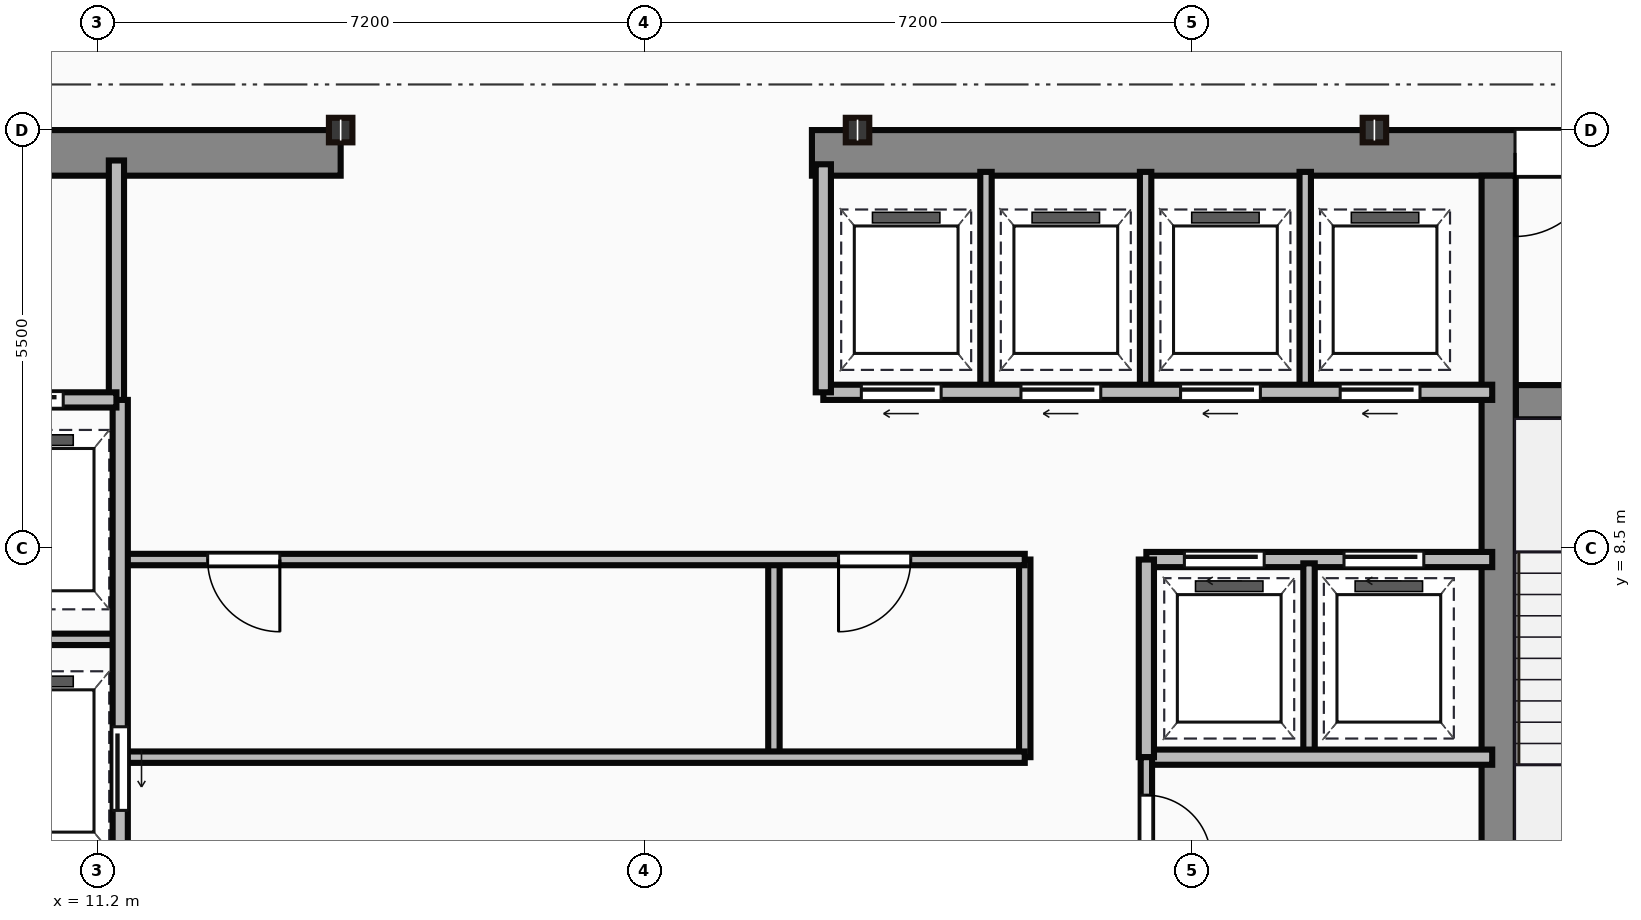
"""IFC4 building model, lengths in metres.
Left out: names, types, materials, properties, quantities, classifications, styles, units other than length and angle.
Written with IfcOpenShell. Run it as: python <this file> out.ifc"""

import sys

from ifc_helpers import new_model, si_unit, direction, frame, frame_2d, origin, origin_2d, place, context, subcontext, project, spatial, rectangle, i_section, extrude, source, transform, mapped, element, fill, save


model = new_model("IFC4")
c1 = context("Model", 3, precision=1e-05, world=origin(), true_north=direction((0.0, 1.0)))
c2 = subcontext(c1, "Body", "Model", "MODEL_VIEW")
j1 = project(units=[si_unit("LENGTHUNIT", "METRE"), si_unit("PLANEANGLEUNIT", "RADIAN")], contexts=[c1])
p1 = place(None, origin())
s1 = spatial("IfcSite", under=j1, at=p1, CompositionType="ELEMENT")
p2 = place(p1, origin())
s2 = spatial("IfcBuilding", under=s1, at=p2, CompositionType="ELEMENT")
p3 = place(p2, frame((0.0, 0.0, 210.5)))
s3 = spatial("IfcBuildingStorey", under=s2, at=p3, CompositionType="ELEMENT", Elevation=210.5)
m1 = source(origin(), c2, "Body", "SweptSolid", [
    extrude(rectangle(XDim=9.1, YDim=0.6, at=frame_2d((4.55, 0.0))), origin(), (0.0, 0.0, 1.0), 3.65),
])
p4 = place(p3, frame((5.3, 13.7, 0.0), z_axis=(0.0, 0.0, 1.0), x_axis=(1.0, 0.0, 0.0)))
e1 = element("IfcWall", 1, at=p4, inside=s3, PredefinedType="SHEAR", context=c2, shape_type="MappedRepresentation", body=[
    mapped(m1, transform((0.0, 0.0, 0.0))),
])
p5 = place(p4, frame((4.1, 0.0, 0.0)))
e2 = element("IfcOpeningElement", 2, at=p5, cuts=e1, PredefinedType="OPENING", context=c2, shape_type="SweptSolid", body=[
    extrude(rectangle(XDim=1.1, YDim=2.15, at=frame_2d((0.55, 1.075))), frame((0.0, 0.31, 0.0), z_axis=(0.0, -1.0, 0.0), x_axis=(1.0, 0.0, 0.0)), (0.0, 0.0, 1.0), 0.62),
])
m2 = source(origin(), c2, "Body", "SweptSolid", [
    extrude(rectangle(XDim=12.6, YDim=0.6, at=frame_2d((6.3, 0.0))), origin(), (0.0, 0.0, 1.0), 3.65),
])
p6 = place(p3, frame((20.6, 13.7, 0.0), z_axis=(0.0, 0.0, 1.0), x_axis=(1.0, 0.0, 0.0)))
e3 = element("IfcWall", 3, at=p6, inside=s3, PredefinedType="SHEAR", context=c2, shape_type="MappedRepresentation", body=[
    mapped(m2, transform((0.0, 0.0, 0.0))),
])
p7 = place(p6, frame((9.25, 0.0, 0.0)))
e4 = element("IfcOpeningElement", 4, at=p7, cuts=e3, PredefinedType="OPENING", context=c2, shape_type="SweptSolid", body=[
    extrude(rectangle(XDim=1.1, YDim=2.15, at=frame_2d((0.55, 1.075))), frame((0.0, 0.31, 0.0), z_axis=(0.0, -1.0, 0.0), x_axis=(1.0, 0.0, 0.0)), (0.0, 0.0, 1.0), 0.62),
])
m3 = source(origin(), c2, "Body", "SweptSolid", [
    extrude(rectangle(XDim=12.5, YDim=0.45, at=frame_2d((6.25, 0.0))), origin(), (0.0, 0.0, 1.0), 3.65),
])
p8 = place(p3, frame((29.635, 0.9, 0.0), z_axis=(0.0, 0.0, 1.0), x_axis=(0.0, 1.0, 0.0)))
e5 = element("IfcWall", 5, at=p8, inside=s3, PredefinedType="SHEAR", context=c2, shape_type="MappedRepresentation", body=[
    mapped(m3, transform((0.0, 0.0, 0.0))),
])
m4 = source(origin(), c2, "Body", "SweptSolid", [
    extrude(rectangle(XDim=3.39, YDim=0.45, at=frame_2d((1.695, 0.0))), origin(), (0.0, 0.0, 1.0), 3.65),
])
p9 = place(p3, frame((29.86, 10.42, 0.0), z_axis=(0.0, 0.0, 1.0), x_axis=(1.0, 0.0, 0.0)))
e6 = element("IfcWall", 6, at=p9, inside=s3, PredefinedType="SHEAR", context=c2, shape_type="MappedRepresentation", body=[
    mapped(m4, transform((0.0, 0.0, 0.0))),
])
p10 = place(p9, frame((1.1, 0.0, 0.0)))
e7 = element("IfcOpeningElement", 7, at=p10, cuts=e6, PredefinedType="OPENING", context=c2, shape_type="SweptSolid", body=[
    extrude(rectangle(XDim=1.1, YDim=2.15, at=frame_2d((0.55, 1.075))), frame((0.0, 0.235, 0.0), z_axis=(0.0, -1.0, 0.0), x_axis=(1.0, 0.0, 0.0)), (0.0, 0.0, 1.0), 0.47),
])
m5 = source(origin(), c2, "Body", "SweptSolid", [
    extrude(i_section(OverallWidth=0.309, OverallDepth=0.323, WebThickness=0.014, FlangeThickness=0.023, at=origin_2d()), origin(), (0.0, 0.0, 1.0), 3.65),
])
for number, where, z_axis, x_axis in (
    (8, (14.4, 14.0, 0.0), (0.0, 0.0, 1.0), (1.0, 0.0, 0.0)),
    (9, (21.2, 14.0, 0.0), (0.0, 0.0, 1.0), (1.0, 0.0, 0.0)),
    (10, (28.0, 14.0, 0.0), (0.0, 0.0, 1.0), (1.0, 0.0, 0.0)),
):
    element("IfcColumn", number, at=place(p3, frame(where, z_axis=z_axis, x_axis=x_axis)), inside=s3, PredefinedType="COLUMN", context=c2, shape_type="MappedRepresentation", body=[
        mapped(m5, transform((0.0, 0.0, 0.0))),
    ])
m6 = source(origin(), c2, "Body", "SweptSolid", [
    extrude(rectangle(XDim=3.18, YDim=0.2, at=frame_2d((1.59, 0.0))), origin(), (0.0, 0.0, 1.0), 3.4),
])
p11 = place(p3, frame((11.45, 10.42, 0.0), z_axis=(0.0, 0.0, 1.0), x_axis=(0.0, 1.0, 0.0)))
e11 = element("IfcWall", 11, at=p11, inside=s3, PredefinedType="PARTITIONING", context=c2, shape_type="MappedRepresentation", body=[
    mapped(m6, transform((0.0, 0.0, 0.0))),
])
m7 = source(origin(), c2, "Body", "SweptSolid", [
    extrude(rectangle(XDim=2.35, YDim=0.2, at=frame_2d((1.175, 0.0))), origin(), (0.0, 0.0, 1.0), 3.4),
])
p12 = place(p3, frame((9.1, 10.45, 0.0), z_axis=(0.0, 0.0, 1.0), x_axis=(1.0, 0.0, 0.0)))
e12 = element("IfcWall", 12, at=p12, inside=s3, PredefinedType="PARTITIONING", context=c2, shape_type="MappedRepresentation", body=[
    mapped(m7, transform((0.0, 0.0, 0.0))),
])
p13 = place(p12, frame((0.55, 0.0, 0.0)))
e13 = element("IfcOpeningElement", 13, at=p13, cuts=e12, PredefinedType="OPENING", context=c2, shape_type="SweptSolid", body=[
    extrude(rectangle(XDim=1.1, YDim=2.15, at=frame_2d((0.55, 1.075))), frame((0.0, 0.11, 0.0), z_axis=(0.0, -1.0, 0.0), x_axis=(1.0, 0.0, 0.0)), (0.0, 0.0, 1.0), 0.22),
])
m8 = source(origin(), c2, "Body", "SweptSolid", [
    extrude(rectangle(XDim=9.6, YDim=0.2, at=frame_2d((4.8, 0.0))), origin(), (0.0, 0.0, 1.0), 3.4),
])
p14 = place(p3, frame((11.5, 0.85, 0.0), z_axis=(0.0, 0.0, 1.0), x_axis=(0.0, 1.0, 0.0)))
e14 = element("IfcWall", 14, at=p14, inside=s3, PredefinedType="PARTITIONING", context=c2, shape_type="MappedRepresentation", body=[
    mapped(m8, transform((0.0, 0.0, 0.0))),
])
p15 = place(p14, frame((4.2, 0.0, 0.0)))
e15 = element("IfcOpeningElement", 15, at=p15, cuts=e14, PredefinedType="OPENING", context=c2, shape_type="SweptSolid", body=[
    extrude(rectangle(XDim=1.1, YDim=2.15, at=frame_2d((0.55, 1.075))), frame((0.0, 0.11, 0.0), z_axis=(0.0, -1.0, 0.0), x_axis=(1.0, 0.0, 0.0)), (0.0, 0.0, 1.0), 0.22),
])
p16 = place(p14, frame((0.9, 0.0, 0.0)))
e16 = element("IfcOpeningElement", 16, at=p16, cuts=e14, PredefinedType="OPENING", context=c2, shape_type="SweptSolid", body=[
    extrude(rectangle(XDim=1.2, YDim=2.15, at=frame_2d((0.6, 1.075))), frame((0.0, 0.11, 0.0), z_axis=(0.0, -1.0, 0.0), x_axis=(1.0, 0.0, 0.0)), (0.0, 0.0, 1.0), 0.22),
])
m9 = source(origin(), c2, "Body", "SweptSolid", [
    extrude(rectangle(XDim=2.4, YDim=0.15, at=frame_2d((1.2, 0.0))), origin(), (0.0, 0.0, 1.0), 3.4),
])
p17 = place(p3, frame((9.1, 7.3, 0.0), z_axis=(0.0, 0.0, 1.0), x_axis=(1.0, 0.0, 0.0)))
e17 = element("IfcWall", 17, at=p17, inside=s3, PredefinedType="PARTITIONING", context=c2, shape_type="MappedRepresentation", body=[
    mapped(m9, transform((0.0, 0.0, 0.0))),
])
m10 = source(origin(), c2, "Body", "SweptSolid", [
    extrude(rectangle(XDim=11.85, YDim=0.15, at=frame_2d((5.925, 0.0))), origin(), (0.0, 0.0, 1.0), 3.4),
])
p18 = place(p3, frame((11.55, 5.75, 0.0), z_axis=(0.0, 0.0, 1.0), x_axis=(1.0, 0.0, 0.0)))
e18 = element("IfcWall", 18, at=p18, inside=s3, PredefinedType="PARTITIONING", context=c2, shape_type="MappedRepresentation", body=[
    mapped(m10, transform((0.0, 0.0, 0.0))),
])
p19 = place(p3, frame((11.55, 8.35, 0.0), z_axis=(0.0, 0.0, 1.0), x_axis=(1.0, 0.0, 0.0)))
e19 = element("IfcWall", 19, at=p19, inside=s3, PredefinedType="PARTITIONING", context=c2, shape_type="MappedRepresentation", body=[
    mapped(m10, transform((0.0, 0.0, 0.0))),
])
p20 = place(p19, frame((1.1, 0.0, 0.0)))
e20 = element("IfcOpeningElement", 20, at=p20, cuts=e19, PredefinedType="OPENING", context=c2, shape_type="SweptSolid", body=[
    extrude(rectangle(XDim=0.95, YDim=2.15, at=frame_2d((0.475, 1.075))), frame((0.0, 0.085, 0.0), z_axis=(0.0, -1.0, 0.0), x_axis=(1.0, 0.0, 0.0)), (0.0, 0.0, 1.0), 0.17),
])
p21 = place(p19, frame((9.4, 0.0, 0.0)))
e21 = element("IfcOpeningElement", 21, at=p21, cuts=e19, PredefinedType="OPENING", context=c2, shape_type="SweptSolid", body=[
    extrude(rectangle(XDim=0.95, YDim=2.15, at=frame_2d((0.475, 1.075))), frame((0.0, 0.085, 0.0), z_axis=(0.0, -1.0, 0.0), x_axis=(1.0, 0.0, 0.0)), (0.0, 0.0, 1.0), 0.17),
])
m11 = source(origin(), c2, "Body", "SweptSolid", [
    extrude(rectangle(XDim=2.6, YDim=0.15, at=frame_2d((1.3, 0.0))), origin(), (0.0, 0.0, 1.0), 3.4),
])
p22 = place(p3, frame((23.4, 5.75, 0.0), z_axis=(0.0, 0.0, 1.0), x_axis=(0.0, 1.0, 0.0)))
e22 = element("IfcWall", 22, at=p22, inside=s3, PredefinedType="PARTITIONING", context=c2, shape_type="MappedRepresentation", body=[
    mapped(m11, transform((0.0, 0.0, 0.0))),
])
m12 = source(origin(), c2, "Body", "SweptSolid", [
    extrude(rectangle(XDim=2.5, YDim=0.15, at=frame_2d((1.25, 0.0))), origin(), (0.0, 0.0, 1.0), 3.4),
])
p23 = place(p3, frame((20.1, 5.8, 0.0), z_axis=(0.0, 0.0, 1.0), x_axis=(0.0, 1.0, 0.0)))
e23 = element("IfcWall", 23, at=p23, inside=s3, PredefinedType="PARTITIONING", context=c2, shape_type="MappedRepresentation", body=[
    mapped(m12, transform((0.0, 0.0, 0.0))),
])
m13 = source(origin(), c2, "Body", "SweptSolid", [
    extrude(rectangle(XDim=8.8, YDim=0.2, at=frame_2d((4.4, 0.0))), origin(), (0.0, 0.0, 1.0), 3.4),
])
p24 = place(p3, frame((20.75, 10.55, 0.0), z_axis=(0.0, 0.0, 1.0), x_axis=(1.0, 0.0, 0.0)))
e24 = element("IfcWall", 24, at=p24, inside=s3, PredefinedType="PARTITIONING", context=c2, shape_type="MappedRepresentation", body=[
    mapped(m13, transform((0.0, 0.0, 0.0))),
])
p25 = place(p24, frame((0.5, 0.0, 0.0)))
e25 = element("IfcOpeningElement", 25, at=p25, cuts=e24, PredefinedType="OPENING", context=c2, shape_type="SweptSolid", body=[
    extrude(rectangle(XDim=1.05, YDim=2.15, at=frame_2d((0.525, 1.075))), frame((0.0, 0.11, 0.0), z_axis=(0.0, -1.0, 0.0), x_axis=(1.0, 0.0, 0.0)), (0.0, 0.0, 1.0), 0.22),
])
p26 = place(p24, frame((2.6, 0.0, 0.0)))
e26 = element("IfcOpeningElement", 26, at=p26, cuts=e24, PredefinedType="OPENING", context=c2, shape_type="SweptSolid", body=[
    extrude(rectangle(XDim=1.05, YDim=2.15, at=frame_2d((0.525, 1.075))), frame((0.0, 0.11, 0.0), z_axis=(0.0, -1.0, 0.0), x_axis=(1.0, 0.0, 0.0)), (0.0, 0.0, 1.0), 0.22),
])
p27 = place(p24, frame((4.7, 0.0, 0.0)))
e27 = element("IfcOpeningElement", 27, at=p27, cuts=e24, PredefinedType="OPENING", context=c2, shape_type="SweptSolid", body=[
    extrude(rectangle(XDim=1.05, YDim=2.15, at=frame_2d((0.525, 1.075))), frame((0.0, 0.11, 0.0), z_axis=(0.0, -1.0, 0.0), x_axis=(1.0, 0.0, 0.0)), (0.0, 0.0, 1.0), 0.22),
])
p28 = place(p24, frame((6.8, 0.0, 0.0)))
e28 = element("IfcOpeningElement", 28, at=p28, cuts=e24, PredefinedType="OPENING", context=c2, shape_type="SweptSolid", body=[
    extrude(rectangle(XDim=1.05, YDim=2.15, at=frame_2d((0.525, 1.075))), frame((0.0, 0.11, 0.0), z_axis=(0.0, -1.0, 0.0), x_axis=(1.0, 0.0, 0.0)), (0.0, 0.0, 1.0), 0.22),
])
m14 = source(origin(), c2, "Body", "SweptSolid", [
    extrude(rectangle(XDim=3.0, YDim=0.2, at=frame_2d((1.5, 0.0))), origin(), (0.0, 0.0, 1.0), 3.4),
])
p29 = place(p3, frame((20.75, 10.55, 0.0), z_axis=(0.0, 0.0, 1.0), x_axis=(0.0, 1.0, 0.0)))
e29 = element("IfcWall", 29, at=p29, inside=s3, PredefinedType="PARTITIONING", context=c2, shape_type="MappedRepresentation", body=[
    mapped(m14, transform((0.0, 0.0, 0.0))),
])
m15 = source(origin(), c2, "Body", "SweptSolid", [
    extrude(rectangle(XDim=2.85, YDim=0.15, at=frame_2d((1.425, 0.0))), origin(), (0.0, 0.0, 1.0), 3.4),
])
for number, where, z_axis, x_axis in (
    (30, (22.89, 10.6, 0.0), (0.0, 0.0, 1.0), (0.0, 1.0, 0.0)),
    (31, (24.99, 10.6, 0.0), (0.0, 0.0, 1.0), (0.0, 1.0, 0.0)),
    (32, (27.09, 10.6, 0.0), (0.0, 0.0, 1.0), (0.0, 1.0, 0.0)),
):
    element("IfcWall", number, at=place(p3, frame(where, z_axis=z_axis, x_axis=x_axis)), inside=s3, PredefinedType="PARTITIONING", context=c2, shape_type="MappedRepresentation", body=[
        mapped(m15, transform((0.0, 0.0, 0.0))),
    ])
m16 = source(origin(), c2, "Body", "SweptSolid", [
    extrude(rectangle(XDim=4.55, YDim=0.2, at=frame_2d((2.275, 0.0))), origin(), (0.0, 0.0, 1.0), 3.4),
])
p30 = place(p3, frame((25.0, 8.35, 0.0), z_axis=(0.0, 0.0, 1.0), x_axis=(1.0, 0.0, 0.0)))
e33 = element("IfcWall", 33, at=p30, inside=s3, PredefinedType="PARTITIONING", context=c2, shape_type="MappedRepresentation", body=[
    mapped(m16, transform((0.0, 0.0, 0.0))),
])
p31 = place(p30, frame((0.5, 0.0, 0.0)))
e34 = element("IfcOpeningElement", 34, at=p31, cuts=e33, PredefinedType="OPENING", context=c2, shape_type="SweptSolid", body=[
    extrude(rectangle(XDim=1.05, YDim=2.15, at=frame_2d((0.525, 1.075))), frame((0.0, 0.11, 0.0), z_axis=(0.0, -1.0, 0.0), x_axis=(1.0, 0.0, 0.0)), (0.0, 0.0, 1.0), 0.22),
])
p32 = place(p30, frame((2.6, 0.0, 0.0)))
e35 = element("IfcOpeningElement", 35, at=p32, cuts=e33, PredefinedType="OPENING", context=c2, shape_type="SweptSolid", body=[
    extrude(rectangle(XDim=1.05, YDim=2.15, at=frame_2d((0.525, 1.075))), frame((0.0, 0.11, 0.0), z_axis=(0.0, -1.0, 0.0), x_axis=(1.0, 0.0, 0.0)), (0.0, 0.0, 1.0), 0.22),
])
p33 = place(p3, frame((25.0, 5.75, 0.0), z_axis=(0.0, 0.0, 1.0), x_axis=(1.0, 0.0, 0.0)))
e36 = element("IfcWall", 36, at=p33, inside=s3, PredefinedType="PARTITIONING", context=c2, shape_type="MappedRepresentation", body=[
    mapped(m16, transform((0.0, 0.0, 0.0))),
])
m17 = source(origin(), c2, "Body", "SweptSolid", [
    extrude(rectangle(XDim=2.6, YDim=0.2, at=frame_2d((1.3, 0.0))), origin(), (0.0, 0.0, 1.0), 3.4),
])
p34 = place(p3, frame((25.0, 5.75, 0.0), z_axis=(0.0, 0.0, 1.0), x_axis=(0.0, 1.0, 0.0)))
e37 = element("IfcWall", 37, at=p34, inside=s3, PredefinedType="PARTITIONING", context=c2, shape_type="MappedRepresentation", body=[
    mapped(m17, transform((0.0, 0.0, 0.0))),
])
p35 = place(p3, frame((27.14, 5.8, 0.0), z_axis=(0.0, 0.0, 1.0), x_axis=(0.0, 1.0, 0.0)))
e38 = element("IfcWall", 38, at=p35, inside=s3, PredefinedType="PARTITIONING", context=c2, shape_type="MappedRepresentation", body=[
    mapped(m12, transform((0.0, 0.0, 0.0))),
])
m18 = source(origin(), c2, "Body", "SweptSolid", [
    extrude(rectangle(XDim=4.9, YDim=0.15, at=frame_2d((2.45, 0.0))), origin(), (0.0, 0.0, 1.0), 3.4),
])
p36 = place(p3, frame((25.0, 0.85, 0.0), z_axis=(0.0, 0.0, 1.0), x_axis=(0.0, 1.0, 0.0)))
e39 = element("IfcWall", 39, at=p36, inside=s3, PredefinedType="PARTITIONING", context=c2, shape_type="MappedRepresentation", body=[
    mapped(m18, transform((0.0, 0.0, 0.0))),
])
p37 = place(p36, frame((1.85, 0.0, 0.0)))
e40 = element("IfcOpeningElement", 40, at=p37, cuts=e39, PredefinedType="OPENING", context=c2, shape_type="SweptSolid", body=[
    extrude(rectangle(XDim=0.95, YDim=2.15, at=frame_2d((0.475, 1.075))), frame((0.0, 0.085, 0.0), z_axis=(0.0, -1.0, 0.0), x_axis=(1.0, 0.0, 0.0)), (0.0, 0.0, 1.0), 0.17),
])
p38 = place(p36, frame((3.55, 0.0, 0.0)))
e41 = element("IfcOpeningElement", 41, at=p38, cuts=e39, PredefinedType="OPENING", context=c2, shape_type="SweptSolid", body=[
    extrude(rectangle(XDim=0.85, YDim=2.15, at=frame_2d((0.425, 1.075))), frame((0.0, 0.085, 0.0), z_axis=(0.0, -1.0, 0.0), x_axis=(1.0, 0.0, 0.0)), (0.0, 0.0, 1.0), 0.17),
])
m19 = source(origin(), c2, "Body", "SweptSolid", [
    extrude(rectangle(XDim=1.1, YDim=2.15, at=frame_2d((0.55, 1.075))), frame((0.0, 0.025, 0.0), z_axis=(0.0, -1.0, 0.0), x_axis=(1.0, 0.0, 0.0)), (0.0, 0.0, 1.0), 0.05),
])
p39 = place(p7, origin())
e42 = element("IfcDoor", 42, at=p39, inside=s3, OperationType="SINGLE_SWING_LEFT", PredefinedType="DOOR", context=c2, shape_type="MappedRepresentation", body=[
    mapped(m19, transform((0.0, 0.0, 0.0))),
])
fill(e4, e42)
p40 = place(p13, origin())
e43 = element("IfcDoor", 43, at=p40, inside=s3, OperationType="SLIDING_TO_LEFT", PredefinedType="DOOR", context=c2, shape_type="MappedRepresentation", body=[
    mapped(m19, transform((0.0, 0.0, 0.0))),
])
fill(e13, e43)
p41 = place(p15, frame((1.1, 0.0, 0.0), z_axis=(0.0, 0.0, 1.0), x_axis=(-1.0, 0.0, 0.0)))
e44 = element("IfcDoor", 44, at=p41, inside=s3, OperationType="SLIDING_TO_LEFT", PredefinedType="DOOR", context=c2, shape_type="MappedRepresentation", body=[
    mapped(m19, transform((0.0, 0.0, 0.0))),
])
fill(e15, e44)
m20 = source(origin(), c2, "Body", "SweptSolid", [
    extrude(rectangle(XDim=0.95, YDim=2.15, at=frame_2d((0.475, 1.075))), frame((0.0, 0.025, 0.0), z_axis=(0.0, -1.0, 0.0), x_axis=(1.0, 0.0, 0.0)), (0.0, 0.0, 1.0), 0.05),
])
p42 = place(p20, origin())
e45 = element("IfcDoor", 45, at=p42, inside=s3, OperationType="SINGLE_SWING_RIGHT", PredefinedType="DOOR", context=c2, shape_type="MappedRepresentation", body=[
    mapped(m20, transform((0.0, 0.0, 0.0))),
])
fill(e20, e45)
p43 = place(p21, origin())
e46 = element("IfcDoor", 46, at=p43, inside=s3, OperationType="SINGLE_SWING_LEFT", PredefinedType="DOOR", context=c2, shape_type="MappedRepresentation", body=[
    mapped(m20, transform((0.0, 0.0, 0.0))),
])
fill(e21, e46)
m21 = source(origin(), c2, "Body", "SweptSolid", [
    extrude(rectangle(XDim=1.05, YDim=2.15, at=frame_2d((0.525, 1.075))), frame((0.0, 0.025, 0.0), z_axis=(0.0, -1.0, 0.0), x_axis=(1.0, 0.0, 0.0)), (0.0, 0.0, 1.0), 0.05),
])
p44 = place(p25, frame((1.05, 0.0, 0.0), z_axis=(0.0, 0.0, 1.0), x_axis=(-1.0, 0.0, 0.0)))
e47 = element("IfcDoor", 47, at=p44, inside=s3, OperationType="SLIDING_TO_LEFT", PredefinedType="DOOR", context=c2, shape_type="MappedRepresentation", body=[
    mapped(m21, transform((0.0, 0.0, 0.0))),
])
fill(e25, e47)
p45 = place(p26, frame((1.05, 0.0, 0.0), z_axis=(0.0, 0.0, 1.0), x_axis=(-1.0, 0.0, 0.0)))
e48 = element("IfcDoor", 48, at=p45, inside=s3, OperationType="SLIDING_TO_LEFT", PredefinedType="DOOR", context=c2, shape_type="MappedRepresentation", body=[
    mapped(m21, transform((0.0, 0.0, 0.0))),
])
fill(e26, e48)
p46 = place(p27, frame((1.05, 0.0, 0.0), z_axis=(0.0, 0.0, 1.0), x_axis=(-1.0, 0.0, 0.0)))
e49 = element("IfcDoor", 49, at=p46, inside=s3, OperationType="SLIDING_TO_LEFT", PredefinedType="DOOR", context=c2, shape_type="MappedRepresentation", body=[
    mapped(m21, transform((0.0, 0.0, 0.0))),
])
fill(e27, e49)
p47 = place(p28, frame((1.05, 0.0, 0.0), z_axis=(0.0, 0.0, 1.0), x_axis=(-1.0, 0.0, 0.0)))
e50 = element("IfcDoor", 50, at=p47, inside=s3, OperationType="SLIDING_TO_LEFT", PredefinedType="DOOR", context=c2, shape_type="MappedRepresentation", body=[
    mapped(m21, transform((0.0, 0.0, 0.0))),
])
fill(e28, e50)
p48 = place(p31, origin())
e51 = element("IfcDoor", 51, at=p48, inside=s3, OperationType="SLIDING_TO_LEFT", PredefinedType="DOOR", context=c2, shape_type="MappedRepresentation", body=[
    mapped(m21, transform((0.0, 0.0, 0.0))),
])
fill(e34, e51)
p49 = place(p32, origin())
e52 = element("IfcDoor", 52, at=p49, inside=s3, OperationType="SLIDING_TO_LEFT", PredefinedType="DOOR", context=c2, shape_type="MappedRepresentation", body=[
    mapped(m21, transform((0.0, 0.0, 0.0))),
])
fill(e35, e52)
m22 = source(origin(), c2, "Body", "SweptSolid", [
    extrude(rectangle(XDim=0.85, YDim=2.15, at=frame_2d((0.425, 1.075))), frame((0.0, 0.025, 0.0), z_axis=(0.0, -1.0, 0.0), x_axis=(1.0, 0.0, 0.0)), (0.0, 0.0, 1.0), 0.05),
])
p50 = place(p38, origin())
e53 = element("IfcDoor", 53, at=p50, inside=s3, OperationType="SINGLE_SWING_LEFT", PredefinedType="DOOR", context=c2, shape_type="MappedRepresentation", body=[
    mapped(m22, transform((0.0, 0.0, 0.0))),
])
fill(e41, e53)
save(model, sys.argv[1])
